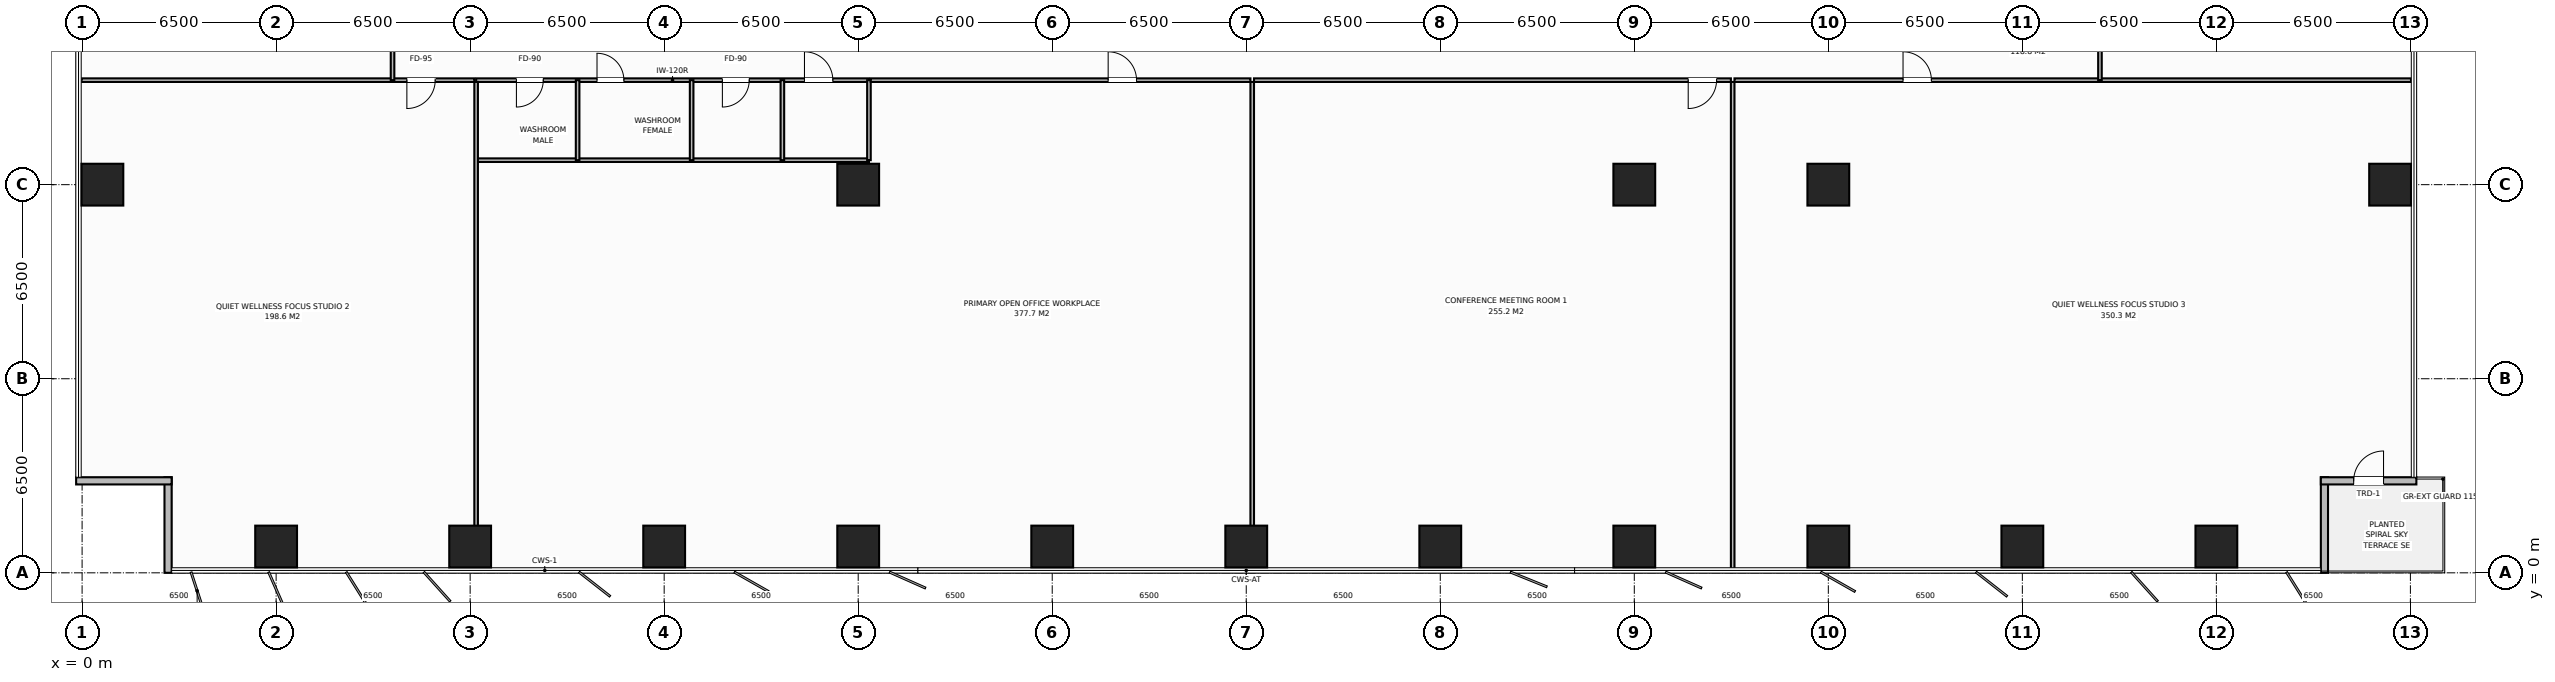
"""IFC4 building model, lengths in metres.
Left out: names, types, materials, properties, quantities, classifications, styles, units other than length and angle.
Written with IfcOpenShell. Run it as: python <this file> out.ifc"""

import sys

from ifc_helpers import new_model, si_unit, direction, frame, frame_2d, origin, origin_2d, place, context, subcontext, project, spatial, rectangle, extrude, element, fill, save


model = new_model("IFC4")
c1 = context("Model", 3, precision=1e-05, world=origin(), true_north=direction((0.0, 1.0)))
c2 = subcontext(c1, "Body", "Model", "MODEL_VIEW")
j1 = project(units=[si_unit("LENGTHUNIT", "METRE"), si_unit("PLANEANGLEUNIT", "RADIAN")], contexts=[c1])
p1 = place(None, origin())
s1 = spatial("IfcSite", under=j1, at=p1, CompositionType="ELEMENT")
p2 = place(p1, origin())
s2 = spatial("IfcBuilding", under=s1, at=p2, CompositionType="ELEMENT")
p3 = place(p2, frame((0.0, 0.0, 46.8)))
s3 = spatial("IfcBuildingStorey", under=s2, at=p3, CompositionType="ELEMENT", Elevation=46.8)
for number, where, z_axis, x_axis in (
    (1, (58.5, 13.0, 0.0), (0.0, 0.0, 1.0), (1.0, 0.0, 0.0)),
    (2, (26.0, 13.0, 0.0), (0.0, 0.0, 1.0), (1.0, 0.0, 0.0)),
    (3, (52.0, 13.0, 0.0), (0.0, 0.0, 1.0), (1.0, 0.0, 0.0)),
    (4, (6.5, 0.88, 0.0), (0.0, 0.0, 1.0), (1.0, 0.0, 0.0)),
    (5, (13.0, 0.88, 0.0), (0.0, 0.0, 1.0), (1.0, 0.0, 0.0)),
    (6, (19.5, 0.88, 0.0), (0.0, 0.0, 1.0), (1.0, 0.0, 0.0)),
    (7, (26.0, 0.88, 0.0), (0.0, 0.0, 1.0), (1.0, 0.0, 0.0)),
    (8, (32.5, 0.88, 0.0), (0.0, 0.0, 1.0), (1.0, 0.0, 0.0)),
    (9, (39.0, 0.88, 0.0), (0.0, 0.0, 1.0), (1.0, 0.0, 0.0)),
    (10, (45.5, 0.88, 0.0), (0.0, 0.0, 1.0), (1.0, 0.0, 0.0)),
    (11, (52.0, 0.88, 0.0), (0.0, 0.0, 1.0), (1.0, 0.0, 0.0)),
    (12, (58.5, 0.88, 0.0), (0.0, 0.0, 1.0), (1.0, 0.0, 0.0)),
    (13, (65.0, 0.88, 0.0), (0.0, 0.0, 1.0), (1.0, 0.0, 0.0)),
    (14, (71.5, 0.88, 0.0), (0.0, 0.0, 1.0), (1.0, 0.0, 0.0)),
    (15, (0.68, 13.0, 0.0), (0.0, 0.0, 1.0), (1.0, 0.0, 0.0)),
    (16, (77.32, 13.0, 0.0), (0.0, 0.0, 1.0), (1.0, 0.0, 0.0)),
):
    element("IfcColumn", number, at=place(p3, frame(where, z_axis=z_axis, x_axis=x_axis)), inside=s3, PredefinedType="COLUMN", context=c2, shape_type="SweptSolid", body=[
        extrude(rectangle(XDim=1.4, YDim=1.4, at=origin_2d()), origin(), (0.0, 0.0, 1.0), 3.8),
    ])
for number, where, z_axis, x_axis in (
    (17, (2.88, 0.0, 0.0), (0.0, 0.0, 1.0), (0.0, 1.0, 0.0)),
    (18, (3.0, 3.08, 0.0), (0.0, 0.0, 1.0), (-1.0, 0.0, 0.0)),
    (19, (75.12, 3.2, 0.0), (0.0, 0.0, 1.0), (0.0, -1.0, 0.0)),
):
    element("IfcWall", number, at=place(p3, frame(where, z_axis=z_axis, x_axis=x_axis)), inside=s3, PredefinedType="STANDARD", context=c2, shape_type="SweptSolid", body=[
        extrude(rectangle(XDim=3.2, YDim=0.24, at=frame_2d((1.6, 0.0))), origin(), (0.0, 0.0, 1.0), 3.55),
    ])
p4 = place(p3, frame((78.2, 3.08, 0.0), z_axis=(0.0, 0.0, 1.0), x_axis=(-1.0, 0.0, 0.0)))
e20 = element("IfcWall", 20, at=p4, inside=s3, PredefinedType="STANDARD", context=c2, shape_type="SweptSolid", body=[
    extrude(rectangle(XDim=3.2, YDim=0.24, at=frame_2d((1.6, 0.0))), origin(), (0.0, 0.0, 1.0), 3.55),
])
p5 = place(p4, frame((1.1, 0.0, 0.0)))
e21 = element("IfcOpeningElement", 21, at=p5, cuts=e20, PredefinedType="OPENING", context=c2, shape_type="SweptSolid", body=[
    extrude(rectangle(XDim=1.0, YDim=2.2, at=frame_2d((0.5, 1.1))), frame((0.0, 0.13, 0.0), z_axis=(0.0, -1.0, 0.0), x_axis=(1.0, 0.0, 0.0)), (0.0, 0.0, 1.0), 0.26),
])
p6 = place(p3, frame((13.2, 16.5, 0.0), z_axis=(0.0, 0.0, 1.0), x_axis=(1.0, 0.0, 0.0)))
e22 = element("IfcWall", 22, at=p6, inside=s3, PredefinedType="PARTITIONING", context=c2, shape_type="SweptSolid", body=[
    extrude(rectangle(XDim=13.16, YDim=0.12, at=frame_2d((6.58, 0.0))), origin(), (0.0, 0.0, 1.0), 3.55),
])
p7 = place(p6, frame((1.35, 0.0, 0.0)))
e23 = element("IfcOpeningElement", 23, at=p7, cuts=e22, PredefinedType="OPENING", context=c2, shape_type="SweptSolid", body=[
    extrude(rectangle(XDim=0.9, YDim=2.15, at=frame_2d((0.45, 1.075))), frame((0.0, 0.07, 0.0), z_axis=(0.0, -1.0, 0.0), x_axis=(1.0, 0.0, 0.0)), (0.0, 0.0, 1.0), 0.14),
])
p8 = place(p6, frame((4.05, 0.0, 0.0)))
e24 = element("IfcOpeningElement", 24, at=p8, cuts=e22, PredefinedType="OPENING", context=c2, shape_type="SweptSolid", body=[
    extrude(rectangle(XDim=0.9, YDim=2.15, at=frame_2d((0.45, 1.075))), frame((0.0, 0.07, 0.0), z_axis=(0.0, -1.0, 0.0), x_axis=(1.0, 0.0, 0.0)), (0.0, 0.0, 1.0), 0.14),
])
p9 = place(p6, frame((8.25, 0.0, 0.0)))
e25 = element("IfcOpeningElement", 25, at=p9, cuts=e22, PredefinedType="OPENING", context=c2, shape_type="SweptSolid", body=[
    extrude(rectangle(XDim=0.9, YDim=2.15, at=frame_2d((0.45, 1.075))), frame((0.0, 0.07, 0.0), z_axis=(0.0, -1.0, 0.0), x_axis=(1.0, 0.0, 0.0)), (0.0, 0.0, 1.0), 0.14),
])
p10 = place(p6, frame((11.0, 0.0, 0.0)))
e26 = element("IfcOpeningElement", 26, at=p10, cuts=e22, PredefinedType="OPENING", context=c2, shape_type="SweptSolid", body=[
    extrude(rectangle(XDim=0.95, YDim=2.15, at=frame_2d((0.475, 1.075))), frame((0.0, 0.07, 0.0), z_axis=(0.0, -1.0, 0.0), x_axis=(1.0, 0.0, 0.0)), (0.0, 0.0, 1.0), 0.14),
])
p11 = place(p3, frame((13.2, 13.82, 0.0), z_axis=(0.0, 0.0, 1.0), x_axis=(1.0, 0.0, 0.0)))
e27 = element("IfcWall", 27, at=p11, inside=s3, PredefinedType="PARTITIONING", context=c2, shape_type="SweptSolid", body=[
    extrude(rectangle(XDim=13.16, YDim=0.12, at=frame_2d((6.58, 0.0))), origin(), (0.0, 0.0, 1.0), 3.55),
])
for number, where, z_axis, x_axis in (
    (28, (16.6, 13.82, 0.0), (0.0, 0.0, 1.0), (0.0, 1.0, 0.0)),
    (29, (20.42, 13.82, 0.0), (0.0, 0.0, 1.0), (0.0, 1.0, 0.0)),
    (30, (23.46, 13.82, 0.0), (0.0, 0.0, 1.0), (0.0, 1.0, 0.0)),
    (31, (26.36, 13.82, 0.0), (0.0, 0.0, 1.0), (0.0, 1.0, 0.0)),
):
    element("IfcWall", number, at=place(p3, frame(where, z_axis=z_axis, x_axis=x_axis)), inside=s3, PredefinedType="PARTITIONING", context=c2, shape_type="SweptSolid", body=[
        extrude(rectangle(XDim=2.68, YDim=0.12, at=frame_2d((1.34, 0.0))), origin(), (0.0, 0.0, 1.0), 3.55),
    ])
p12 = place(p3, frame((13.2, 0.02, 0.0), z_axis=(0.0, 0.0, 1.0), x_axis=(0.0, 1.0, 0.0)))
e32 = element("IfcWall", 32, at=p12, inside=s3, PredefinedType="PARTITIONING", context=c2, shape_type="SweptSolid", body=[
    extrude(rectangle(XDim=16.42, YDim=0.12, at=frame_2d((8.21, 0.0))), origin(), (0.0, 0.0, 1.0), 2.9),
])
p13 = place(p3, frame((-0.02, 16.5, 0.0), z_axis=(0.0, 0.0, 1.0), x_axis=(1.0, 0.0, 0.0)))
e33 = element("IfcWall", 33, at=p13, inside=s3, PredefinedType="PARTITIONING", context=c2, shape_type="SweptSolid", body=[
    extrude(rectangle(XDim=13.16, YDim=0.12, at=frame_2d((6.58, 0.0))), origin(), (0.0, 0.0, 1.0), 3.55),
])
p14 = place(p13, frame((10.9, 0.0, 0.0)))
e34 = element("IfcOpeningElement", 34, at=p14, cuts=e33, PredefinedType="OPENING", context=c2, shape_type="SweptSolid", body=[
    extrude(rectangle(XDim=0.95, YDim=2.15, at=frame_2d((0.475, 1.075))), frame((0.0, 0.07, 0.0), z_axis=(0.0, -1.0, 0.0), x_axis=(1.0, 0.0, 0.0)), (0.0, 0.0, 1.0), 0.14),
])
p15 = place(p3, frame((39.2, 0.02, 0.0), z_axis=(0.0, 0.0, 1.0), x_axis=(0.0, 1.0, 0.0)))
e35 = element("IfcWall", 35, at=p15, inside=s3, PredefinedType="PARTITIONING", context=c2, shape_type="SweptSolid", body=[
    extrude(rectangle(XDim=16.42, YDim=0.12, at=frame_2d((8.21, 0.0))), origin(), (0.0, 0.0, 1.0), 2.9),
])
p16 = place(p3, frame((26.42, 16.5, 0.0), z_axis=(0.0, 0.0, 1.0), x_axis=(1.0, 0.0, 0.0)))
e36 = element("IfcWall", 36, at=p16, inside=s3, PredefinedType="PARTITIONING", context=c2, shape_type="SweptSolid", body=[
    extrude(rectangle(XDim=12.72, YDim=0.12, at=frame_2d((6.36, 0.0))), origin(), (0.0, 0.0, 1.0), 3.55),
])
p17 = place(p16, frame((7.954, 0.0, 0.0)))
e37 = element("IfcOpeningElement", 37, at=p17, cuts=e36, PredefinedType="OPENING", context=c2, shape_type="SweptSolid", body=[
    extrude(rectangle(XDim=0.95, YDim=2.15, at=frame_2d((0.475, 1.075))), frame((0.0, 0.07, 0.0), z_axis=(0.0, -1.0, 0.0), x_axis=(1.0, 0.0, 0.0)), (0.0, 0.0, 1.0), 0.14),
])
p18 = place(p3, frame((55.296, 0.02, 0.0), z_axis=(0.0, 0.0, 1.0), x_axis=(0.0, 1.0, 0.0)))
e38 = element("IfcWall", 38, at=p18, inside=s3, PredefinedType="PARTITIONING", context=c2, shape_type="SweptSolid", body=[
    extrude(rectangle(XDim=16.42, YDim=0.12, at=frame_2d((8.21, 0.0))), origin(), (0.0, 0.0, 1.0), 3.55),
])
p19 = place(p3, frame((39.26, 16.5, 0.0), z_axis=(0.0, 0.0, 1.0), x_axis=(1.0, 0.0, 0.0)))
e39 = element("IfcWall", 39, at=p19, inside=s3, PredefinedType="PARTITIONING", context=c2, shape_type="SweptSolid", body=[
    extrude(rectangle(XDim=15.976, YDim=0.12, at=frame_2d((7.988, 0.0))), origin(), (0.0, 0.0, 1.0), 3.55),
])
p20 = place(p19, frame((14.546, 0.0, 0.0)))
e40 = element("IfcOpeningElement", 40, at=p20, cuts=e39, PredefinedType="OPENING", context=c2, shape_type="SweptSolid", body=[
    extrude(rectangle(XDim=0.95, YDim=2.15, at=frame_2d((0.475, 1.075))), frame((0.0, 0.07, 0.0), z_axis=(0.0, -1.0, 0.0), x_axis=(1.0, 0.0, 0.0)), (0.0, 0.0, 1.0), 0.14),
])
p21 = place(p3, frame((55.356, 16.5, 0.0), z_axis=(0.0, 0.0, 1.0), x_axis=(1.0, 0.0, 0.0)))
e41 = element("IfcWall", 41, at=p21, inside=s3, PredefinedType="PARTITIONING", context=c2, shape_type="SweptSolid", body=[
    extrude(rectangle(XDim=22.664, YDim=0.12, at=frame_2d((11.332, 0.0))), origin(), (0.0, 0.0, 1.0), 3.55),
])
p22 = place(p21, frame((5.647, 0.0, 0.0)))
e42 = element("IfcOpeningElement", 42, at=p22, cuts=e41, PredefinedType="OPENING", context=c2, shape_type="SweptSolid", body=[
    extrude(rectangle(XDim=0.95, YDim=2.15, at=frame_2d((0.475, 1.075))), frame((0.0, 0.07, 0.0), z_axis=(0.0, -1.0, 0.0), x_axis=(1.0, 0.0, 0.0)), (0.0, 0.0, 1.0), 0.14),
])
p23 = place(p3, frame((10.4, 16.5, 0.0), z_axis=(0.0, 0.0, 1.0), x_axis=(0.0, 1.0, 0.0)))
e43 = element("IfcWall", 43, at=p23, inside=s3, PredefinedType="PARTITIONING", context=c2, shape_type="SweptSolid", body=[
    extrude(rectangle(XDim=9.5, YDim=0.12, at=frame_2d((4.75, 0.0))), origin(), (0.0, 0.0, 1.0), 3.55),
])
p24 = place(p23, frame((5.325, 0.0, 0.0)))
e44 = element("IfcOpeningElement", 44, at=p24, cuts=e43, PredefinedType="OPENING", context=c2, shape_type="SweptSolid", body=[
    extrude(rectangle(XDim=0.95, YDim=2.15, at=frame_2d((0.475, 1.075))), frame((0.0, 0.07, 0.0), z_axis=(0.0, -1.0, 0.0), x_axis=(1.0, 0.0, 0.0)), (0.0, 0.0, 1.0), 0.14),
])
p25 = place(p3, frame((67.6, 16.5, 0.0), z_axis=(0.0, 0.0, 1.0), x_axis=(0.0, 1.0, 0.0)))
e45 = element("IfcWall", 45, at=p25, inside=s3, PredefinedType="PARTITIONING", context=c2, shape_type="SweptSolid", body=[
    extrude(rectangle(XDim=19.0, YDim=0.12, at=frame_2d((9.5, 0.0))), origin(), (0.0, 0.0, 1.0), 3.55),
])
p26 = place(p25, frame((9.025, 0.0, 0.0)))
e46 = element("IfcOpeningElement", 46, at=p26, cuts=e45, PredefinedType="OPENING", context=c2, shape_type="SweptSolid", body=[
    extrude(rectangle(XDim=0.95, YDim=2.15, at=frame_2d((0.475, 1.075))), frame((0.0, 0.07, 0.0), z_axis=(0.0, -1.0, 0.0), x_axis=(1.0, 0.0, 0.0)), (0.0, 0.0, 1.0), 0.14),
])
p27 = place(p5, origin())
e47 = element("IfcDoor", 47, at=p27, inside=s3, OperationType="SINGLE_SWING_RIGHT", PredefinedType="DOOR", context=c2, shape_type="SweptSolid", body=[
    extrude(rectangle(XDim=1.0, YDim=2.2, at=frame_2d((0.5, 1.1))), frame((0.0, 0.025, 0.0), z_axis=(0.0, -1.0, 0.0), x_axis=(1.0, 0.0, 0.0)), (0.0, 0.0, 1.0), 0.05),
])
fill(e21, e47)
p28 = place(p7, origin())
e48 = element("IfcDoor", 48, at=p28, inside=s3, OperationType="SINGLE_SWING_RIGHT", PredefinedType="DOOR", context=c2, shape_type="SweptSolid", body=[
    extrude(rectangle(XDim=0.9, YDim=2.15, at=frame_2d((0.45, 1.075))), frame((0.0, 0.025, 0.0), z_axis=(0.0, -1.0, 0.0), x_axis=(1.0, 0.0, 0.0)), (0.0, 0.0, 1.0), 0.05),
])
fill(e23, e48)
p29 = place(p8, origin())
e49 = element("IfcDoor", 49, at=p29, inside=s3, OperationType="SINGLE_SWING_LEFT", PredefinedType="DOOR", context=c2, shape_type="SweptSolid", body=[
    extrude(rectangle(XDim=0.9, YDim=2.15, at=frame_2d((0.45, 1.075))), frame((0.0, 0.025, 0.0), z_axis=(0.0, -1.0, 0.0), x_axis=(1.0, 0.0, 0.0)), (0.0, 0.0, 1.0), 0.05),
])
fill(e24, e49)
p30 = place(p9, origin())
e50 = element("IfcDoor", 50, at=p30, inside=s3, OperationType="SINGLE_SWING_RIGHT", PredefinedType="DOOR", context=c2, shape_type="SweptSolid", body=[
    extrude(rectangle(XDim=0.9, YDim=2.15, at=frame_2d((0.45, 1.075))), frame((0.0, 0.025, 0.0), z_axis=(0.0, -1.0, 0.0), x_axis=(1.0, 0.0, 0.0)), (0.0, 0.0, 1.0), 0.05),
])
fill(e25, e50)
p31 = place(p10, origin())
e51 = element("IfcDoor", 51, at=p31, inside=s3, OperationType="SINGLE_SWING_LEFT", PredefinedType="DOOR", context=c2, shape_type="SweptSolid", body=[
    extrude(rectangle(XDim=0.95, YDim=2.15, at=frame_2d((0.475, 1.075))), frame((0.0, 0.025, 0.0), z_axis=(0.0, -1.0, 0.0), x_axis=(1.0, 0.0, 0.0)), (0.0, 0.0, 1.0), 0.05),
])
fill(e26, e51)
p32 = place(p14, origin())
e52 = element("IfcDoor", 52, at=p32, inside=s3, OperationType="SINGLE_SWING_RIGHT", PredefinedType="DOOR", context=c2, shape_type="SweptSolid", body=[
    extrude(rectangle(XDim=0.95, YDim=2.15, at=frame_2d((0.475, 1.075))), frame((0.0, 0.025, 0.0), z_axis=(0.0, -1.0, 0.0), x_axis=(1.0, 0.0, 0.0)), (0.0, 0.0, 1.0), 0.05),
])
fill(e34, e52)
p33 = place(p17, origin())
e53 = element("IfcDoor", 53, at=p33, inside=s3, OperationType="SINGLE_SWING_LEFT", PredefinedType="DOOR", context=c2, shape_type="SweptSolid", body=[
    extrude(rectangle(XDim=0.95, YDim=2.15, at=frame_2d((0.475, 1.075))), frame((0.0, 0.025, 0.0), z_axis=(0.0, -1.0, 0.0), x_axis=(1.0, 0.0, 0.0)), (0.0, 0.0, 1.0), 0.05),
])
fill(e37, e53)
p34 = place(p20, origin())
e54 = element("IfcDoor", 54, at=p34, inside=s3, OperationType="SINGLE_SWING_RIGHT", PredefinedType="DOOR", context=c2, shape_type="SweptSolid", body=[
    extrude(rectangle(XDim=0.95, YDim=2.15, at=frame_2d((0.475, 1.075))), frame((0.0, 0.025, 0.0), z_axis=(0.0, -1.0, 0.0), x_axis=(1.0, 0.0, 0.0)), (0.0, 0.0, 1.0), 0.05),
])
fill(e40, e54)
p35 = place(p22, origin())
e55 = element("IfcDoor", 55, at=p35, inside=s3, OperationType="SINGLE_SWING_LEFT", PredefinedType="DOOR", context=c2, shape_type="SweptSolid", body=[
    extrude(rectangle(XDim=0.95, YDim=2.15, at=frame_2d((0.475, 1.075))), frame((0.0, 0.025, 0.0), z_axis=(0.0, -1.0, 0.0), x_axis=(1.0, 0.0, 0.0)), (0.0, 0.0, 1.0), 0.05),
])
fill(e42, e55)
save(model, sys.argv[1])
